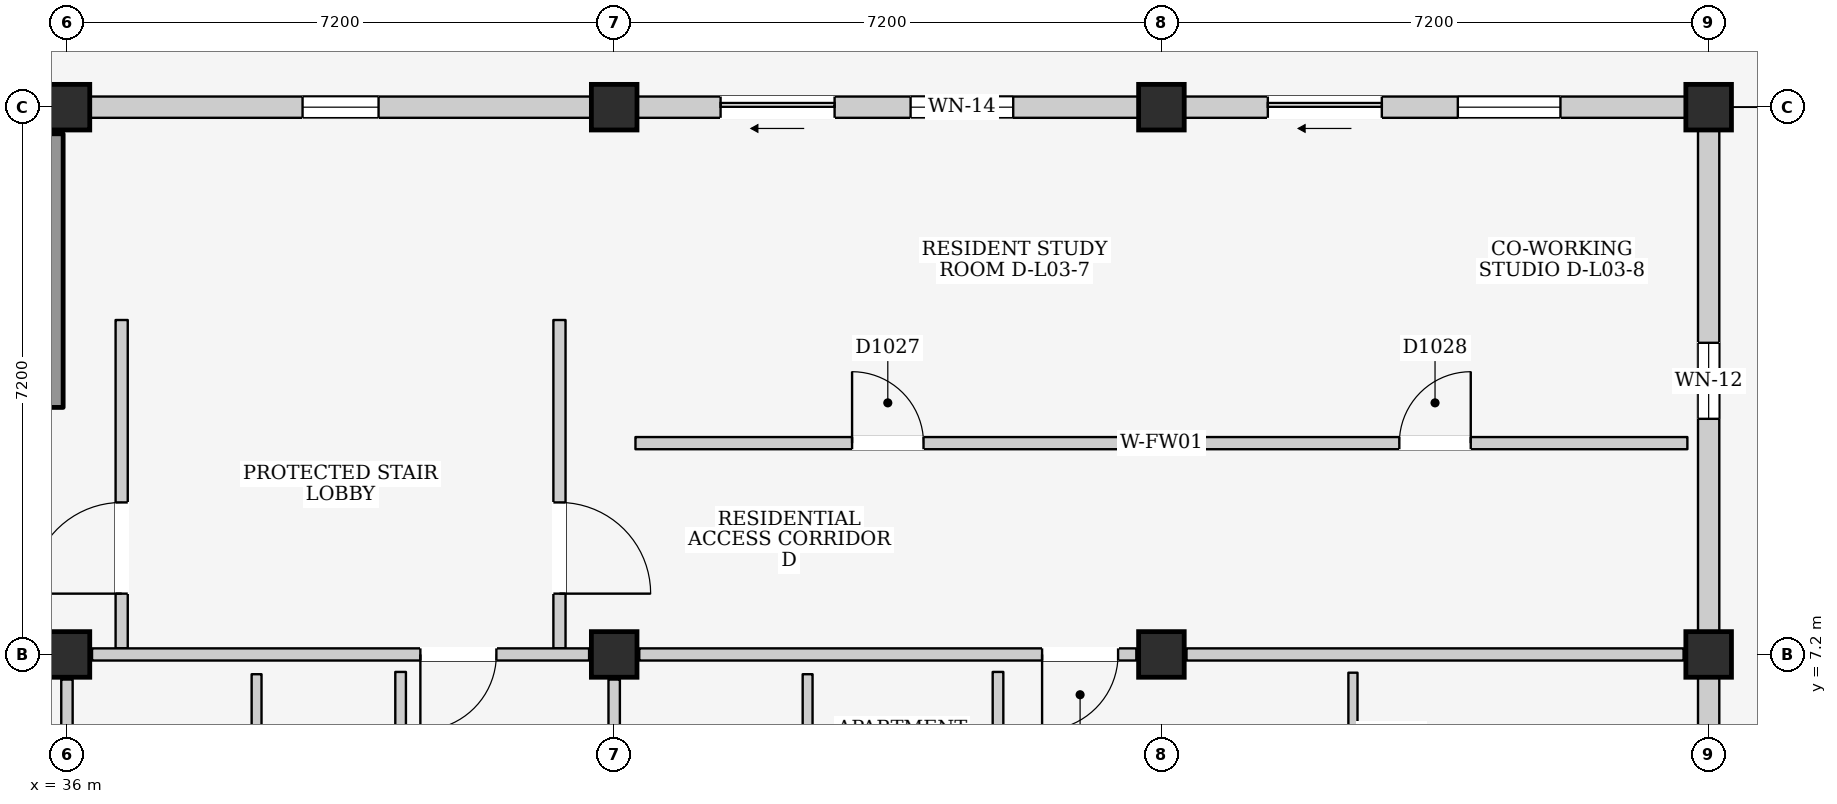
"""IFC4 building model, lengths in metres.
Left out: names, types, materials, properties, quantities, classifications, styles, units other than length and angle.
Written with IfcOpenShell. Run it as: python <this file> out.ifc"""

import sys

from ifc_helpers import new_model, si_unit, direction, frame, frame_2d, origin, origin_2d, place, context, subcontext, project, spatial, rectangle, extrude, element, fill, save


model = new_model("IFC4")
c1 = context("Model", 3, precision=1e-05, world=origin(), true_north=direction((0.0, 1.0)))
c2 = subcontext(c1, "Body", "Model", "MODEL_VIEW")
j1 = project(units=[si_unit("LENGTHUNIT", "METRE"), si_unit("PLANEANGLEUNIT", "RADIAN")], contexts=[c1])
p1 = place(None, origin())
s1 = spatial("IfcSite", under=j1, at=p1, CompositionType="ELEMENT")
p2 = place(p1, origin())
s2 = spatial("IfcBuilding", under=s1, at=p2, CompositionType="ELEMENT")
p3 = place(p2, frame((0.0, 0.0, 12.2)))
s3 = spatial("IfcBuildingStorey", under=s2, at=p3, CompositionType="ELEMENT", Elevation=12.2)
for number, where, z_axis, x_axis in (
    (1, (36.0, 7.2, 0.0), (0.0, 0.0, 1.0), (1.0, 0.0, 0.0)),
    (2, (36.0, 14.4, 0.0), (0.0, 0.0, 1.0), (1.0, 0.0, 0.0)),
    (3, (43.2, 7.2, 0.0), (0.0, 0.0, 1.0), (1.0, 0.0, 0.0)),
    (4, (43.2, 14.4, 0.0), (0.0, 0.0, 1.0), (1.0, 0.0, 0.0)),
    (5, (50.4, 7.2, 0.0), (0.0, 0.0, 1.0), (1.0, 0.0, 0.0)),
    (6, (50.4, 14.4, 0.0), (0.0, 0.0, 1.0), (1.0, 0.0, 0.0)),
    (7, (57.6, 7.2, 0.0), (0.0, 0.0, 1.0), (1.0, 0.0, 0.0)),
    (8, (57.6, 14.4, 0.0), (0.0, 0.0, 1.0), (1.0, 0.0, 0.0)),
):
    element("IfcColumn", number, at=place(p3, frame(where, z_axis=z_axis, x_axis=x_axis)), inside=s3, PredefinedType="COLUMN", context=c2, shape_type="SweptSolid", body=[
        extrude(rectangle(XDim=0.6, YDim=0.6, at=origin_2d()), origin(), (0.0, 0.0, 1.0), 3.2),
    ])
p4 = place(p3, frame((36.3, 14.4, 0.0), z_axis=(0.0, 0.0, 1.0), x_axis=(1.0, 0.0, 0.0)))
e9 = element("IfcWall", 9, at=p4, inside=s3, PredefinedType="ELEMENTEDWALL", context=c2, shape_type="SweptSolid", body=[
    extrude(rectangle(XDim=6.6, YDim=0.28, at=frame_2d((3.3, 0.0))), origin(), (0.0, 0.0, 1.0), 2.365),
])
p5 = place(p4, frame((2.8, 0.0, 1.2)))
e10 = element("IfcOpeningElement", 10, at=p5, cuts=e9, PredefinedType="OPENING", context=c2, shape_type="SweptSolid", body=[
    extrude(rectangle(XDim=1.0, YDim=0.9, at=frame_2d((0.5, 0.45))), frame((0.0, 0.155, 0.0), z_axis=(0.0, -1.0, 0.0), x_axis=(1.0, 0.0, 0.0)), (0.0, 0.0, 1.0), 0.31),
])
p6 = place(p3, frame((43.5, 14.4, 0.0), z_axis=(0.0, 0.0, 1.0), x_axis=(1.0, 0.0, 0.0)))
e11 = element("IfcWall", 11, at=p6, inside=s3, PredefinedType="ELEMENTEDWALL", context=c2, shape_type="SweptSolid", body=[
    extrude(rectangle(XDim=6.6, YDim=0.28, at=frame_2d((3.3, 0.0))), origin(), (0.0, 0.0, 1.0), 2.365),
])
p7 = place(p6, frame((1.1, 0.0, 0.0)))
e12 = element("IfcOpeningElement", 12, at=p7, cuts=e11, PredefinedType="OPENING", context=c2, shape_type="SweptSolid", body=[
    extrude(rectangle(XDim=1.5, YDim=2.12, at=frame_2d((0.75, 1.06))), frame((0.0, 0.155, 0.0), z_axis=(0.0, -1.0, 0.0), x_axis=(1.0, 0.0, 0.0)), (0.0, 0.0, 1.0), 0.31),
])
p8 = place(p6, frame((3.6, 0.0, 0.755)))
e13 = element("IfcOpeningElement", 13, at=p8, cuts=e11, PredefinedType="OPENING", context=c2, shape_type="SweptSolid", body=[
    extrude(rectangle(XDim=1.35, YDim=1.5, at=frame_2d((0.675, 0.75))), frame((0.0, 0.155, 0.0), z_axis=(0.0, -1.0, 0.0), x_axis=(1.0, 0.0, 0.0)), (0.0, 0.0, 1.0), 0.31),
])
p9 = place(p3, frame((57.6, 0.3, 0.0), z_axis=(0.0, 0.0, 1.0), x_axis=(0.0, 1.0, 0.0)))
e14 = element("IfcWall", 14, at=p9, inside=s3, PredefinedType="ELEMENTEDWALL", context=c2, shape_type="SweptSolid", body=[
    extrude(rectangle(XDim=6.6, YDim=0.28, at=frame_2d((3.3, 0.0))), origin(), (0.0, 0.0, 1.0), 2.415),
])
p10 = place(p9, frame((1.4, 0.0, 0.0)))
e15 = element("IfcOpeningElement", 15, at=p10, cuts=e14, PredefinedType="OPENING", context=c2, shape_type="SweptSolid", body=[
    extrude(rectangle(XDim=1.4, YDim=2.1, at=frame_2d((0.7, 1.05))), frame((0.0, 0.155, 0.0), z_axis=(0.0, -1.0, 0.0), x_axis=(1.0, 0.0, 0.0)), (0.0, 0.0, 1.0), 0.31),
])
p11 = place(p9, frame((4.4, 0.0, 0.95)))
e16 = element("IfcOpeningElement", 16, at=p11, cuts=e14, PredefinedType="OPENING", context=c2, shape_type="SweptSolid", body=[
    extrude(rectangle(XDim=1.2, YDim=1.35, at=frame_2d((0.6, 0.675))), frame((0.0, 0.155, 0.0), z_axis=(0.0, -1.0, 0.0), x_axis=(1.0, 0.0, 0.0)), (0.0, 0.0, 1.0), 0.31),
])
p12 = place(p3, frame((50.7, 14.4, 0.0), z_axis=(0.0, 0.0, 1.0), x_axis=(1.0, 0.0, 0.0)))
e17 = element("IfcWall", 17, at=p12, inside=s3, PredefinedType="ELEMENTEDWALL", context=c2, shape_type="SweptSolid", body=[
    extrude(rectangle(XDim=6.6, YDim=0.28, at=frame_2d((3.3, 0.0))), origin(), (0.0, 0.0, 1.0), 2.365),
])
p13 = place(p12, frame((1.1, 0.0, 0.0)))
e18 = element("IfcOpeningElement", 18, at=p13, cuts=e17, PredefinedType="OPENING", context=c2, shape_type="SweptSolid", body=[
    extrude(rectangle(XDim=1.5, YDim=2.12, at=frame_2d((0.75, 1.06))), frame((0.0, 0.155, 0.0), z_axis=(0.0, -1.0, 0.0), x_axis=(1.0, 0.0, 0.0)), (0.0, 0.0, 1.0), 0.31),
])
p14 = place(p12, frame((3.6, 0.0, 0.755)))
e19 = element("IfcOpeningElement", 19, at=p14, cuts=e17, PredefinedType="OPENING", context=c2, shape_type="SweptSolid", body=[
    extrude(rectangle(XDim=1.35, YDim=1.5, at=frame_2d((0.675, 0.75))), frame((0.0, 0.155, 0.0), z_axis=(0.0, -1.0, 0.0), x_axis=(1.0, 0.0, 0.0)), (0.0, 0.0, 1.0), 0.31),
])
p15 = place(p3, frame((57.6, 7.5, 0.0), z_axis=(0.0, 0.0, 1.0), x_axis=(0.0, 1.0, 0.0)))
e20 = element("IfcWall", 20, at=p15, inside=s3, PredefinedType="ELEMENTEDWALL", context=c2, shape_type="SweptSolid", body=[
    extrude(rectangle(XDim=6.6, YDim=0.28, at=frame_2d((3.3, 0.0))), origin(), (0.0, 0.0, 1.0), 2.415),
])
p16 = place(p15, frame((2.8, 0.0, 1.1)))
e21 = element("IfcOpeningElement", 21, at=p16, cuts=e20, PredefinedType="OPENING", context=c2, shape_type="SweptSolid", body=[
    extrude(rectangle(XDim=1.0, YDim=0.9, at=frame_2d((0.5, 0.45))), frame((0.0, 0.155, 0.0), z_axis=(0.0, -1.0, 0.0), x_axis=(1.0, 0.0, 0.0)), (0.0, 0.0, 1.0), 0.31),
])
p17 = place(p3, frame((35.8, 10.45, 0.0), z_axis=(0.0, 0.0, 1.0), x_axis=(0.0, 1.0, 0.0)))
e22 = element("IfcWall", 22, at=p17, inside=s3, PredefinedType="SHEAR", context=c2, shape_type="SweptSolid", body=[
    extrude(rectangle(XDim=3.6, YDim=0.3, at=frame_2d((1.8, 0.0))), origin(), (0.0, 0.0, 1.0), 2.98),
])
p18 = place(p3, frame((36.72, 7.28, 0.0), z_axis=(0.0, 0.0, 1.0), x_axis=(0.0, 1.0, 0.0)))
e23 = element("IfcWall", 23, at=p18, inside=s3, PredefinedType="PARTITIONING", context=c2, shape_type="SweptSolid", body=[
    extrude(rectangle(XDim=4.32, YDim=0.16, at=frame_2d((2.16, 0.0))), origin(), (0.0, 0.0, 1.0), 2.98),
])
p19 = place(p18, frame((0.72, 0.0, 0.0)))
e24 = element("IfcOpeningElement", 24, at=p19, cuts=e23, PredefinedType="OPENING", context=c2, shape_type="SweptSolid", body=[
    extrude(rectangle(XDim=1.2, YDim=2.2, at=frame_2d((0.6, 1.1))), frame((0.0, 0.095, 0.0), z_axis=(0.0, -1.0, 0.0), x_axis=(1.0, 0.0, 0.0)), (0.0, 0.0, 1.0), 0.19),
])
p20 = place(p3, frame((42.48, 7.28, 0.0), z_axis=(0.0, 0.0, 1.0), x_axis=(0.0, 1.0, 0.0)))
e25 = element("IfcWall", 25, at=p20, inside=s3, PredefinedType="PARTITIONING", context=c2, shape_type="SweptSolid", body=[
    extrude(rectangle(XDim=4.32, YDim=0.16, at=frame_2d((2.16, 0.0))), origin(), (0.0, 0.0, 1.0), 2.98),
])
p21 = place(p20, frame((0.72, 0.0, 0.0)))
e26 = element("IfcOpeningElement", 26, at=p21, cuts=e25, PredefinedType="OPENING", context=c2, shape_type="SweptSolid", body=[
    extrude(rectangle(XDim=1.2, YDim=2.2, at=frame_2d((0.6, 1.1))), frame((0.0, 0.095, 0.0), z_axis=(0.0, -1.0, 0.0), x_axis=(1.0, 0.0, 0.0)), (0.0, 0.0, 1.0), 0.19),
])
p22 = place(p3, frame((36.0, 0.33, 0.0), z_axis=(0.0, 0.0, 1.0), x_axis=(0.0, 1.0, 0.0)))
e27 = element("IfcWall", 27, at=p22, inside=s3, PredefinedType="PARTITIONING", context=c2, shape_type="SweptSolid", body=[
    extrude(rectangle(XDim=6.54, YDim=0.15, at=frame_2d((3.27, 0.0))), origin(), (0.0, 0.0, 1.0), 2.415),
])
p23 = place(p3, frame((36.33, 7.2, 0.0), z_axis=(0.0, 0.0, 1.0), x_axis=(1.0, 0.0, 0.0)))
e28 = element("IfcWall", 28, at=p23, inside=s3, PredefinedType="PARTITIONING", context=c2, shape_type="SweptSolid", body=[
    extrude(rectangle(XDim=6.54, YDim=0.16, at=frame_2d((3.27, 0.0))), origin(), (0.0, 0.0, 1.0), 2.365),
])
p24 = place(p23, frame((4.32, 0.0, 0.0)))
e29 = element("IfcOpeningElement", 29, at=p24, cuts=e28, PredefinedType="OPENING", context=c2, shape_type="SweptSolid", body=[
    extrude(rectangle(XDim=1.0, YDim=2.15, at=frame_2d((0.5, 1.075))), frame((0.0, 0.095, 0.0), z_axis=(0.0, -1.0, 0.0), x_axis=(1.0, 0.0, 0.0)), (0.0, 0.0, 1.0), 0.19),
])
p25 = place(p3, frame((43.2, 0.33, 0.0), z_axis=(0.0, 0.0, 1.0), x_axis=(0.0, 1.0, 0.0)))
e30 = element("IfcWall", 30, at=p25, inside=s3, PredefinedType="PARTITIONING", context=c2, shape_type="SweptSolid", body=[
    extrude(rectangle(XDim=6.54, YDim=0.15, at=frame_2d((3.27, 0.0))), origin(), (0.0, 0.0, 1.0), 2.415),
])
p26 = place(p3, frame((38.495, 4.61, 0.0), z_axis=(0.0, 0.0, 1.0), x_axis=(0.0, 1.0, 0.0)))
e31 = element("IfcWall", 31, at=p26, inside=s3, PredefinedType="PARTITIONING", context=c2, shape_type="SweptSolid", body=[
    extrude(rectangle(XDim=2.33, YDim=0.13, at=frame_2d((1.165, 0.0))), origin(), (0.0, 0.0, 1.0), 2.98),
])
p27 = place(p3, frame((40.39, 4.62, 0.0), z_axis=(0.0, 0.0, 1.0), x_axis=(0.0, 1.0, 0.0)))
e32 = element("IfcWall", 32, at=p27, inside=s3, PredefinedType="PARTITIONING", context=c2, shape_type="SweptSolid", body=[
    extrude(rectangle(XDim=2.35, YDim=0.14, at=frame_2d((1.175, 0.0))), origin(), (0.0, 0.0, 1.0), 2.98),
])
p28 = place(p3, frame((43.53, 7.2, 0.0), z_axis=(0.0, 0.0, 1.0), x_axis=(1.0, 0.0, 0.0)))
e33 = element("IfcWall", 33, at=p28, inside=s3, PredefinedType="PARTITIONING", context=c2, shape_type="SweptSolid", body=[
    extrude(rectangle(XDim=6.54, YDim=0.16, at=frame_2d((3.27, 0.0))), origin(), (0.0, 0.0, 1.0), 2.365),
])
p29 = place(p28, frame((5.3, 0.0, 0.0)))
e34 = element("IfcOpeningElement", 34, at=p29, cuts=e33, PredefinedType="OPENING", context=c2, shape_type="SweptSolid", body=[
    extrude(rectangle(XDim=1.0, YDim=2.15, at=frame_2d((0.5, 1.075))), frame((0.0, 0.095, 0.0), z_axis=(0.0, -1.0, 0.0), x_axis=(1.0, 0.0, 0.0)), (0.0, 0.0, 1.0), 0.19),
])
p30 = place(p3, frame((50.73, 7.2, 0.0), z_axis=(0.0, 0.0, 1.0), x_axis=(1.0, 0.0, 0.0)))
e35 = element("IfcWall", 35, at=p30, inside=s3, PredefinedType="PARTITIONING", context=c2, shape_type="SweptSolid", body=[
    extrude(rectangle(XDim=6.54, YDim=0.16, at=frame_2d((3.27, 0.0))), origin(), (0.0, 0.0, 1.0), 2.365),
])
p31 = place(p3, frame((45.745, 3.9, 0.0), z_axis=(0.0, 0.0, 1.0), x_axis=(0.0, 1.0, 0.0)))
e36 = element("IfcWall", 36, at=p31, inside=s3, PredefinedType="PARTITIONING", context=c2, shape_type="SweptSolid", body=[
    extrude(rectangle(XDim=3.04, YDim=0.13, at=frame_2d((1.52, 0.0))), origin(), (0.0, 0.0, 1.0), 2.98),
])
p32 = place(p3, frame((48.25, 3.91, 0.0), z_axis=(0.0, 0.0, 1.0), x_axis=(0.0, 1.0, 0.0)))
e37 = element("IfcWall", 37, at=p32, inside=s3, PredefinedType="PARTITIONING", context=c2, shape_type="SweptSolid", body=[
    extrude(rectangle(XDim=3.06, YDim=0.14, at=frame_2d((1.53, 0.0))), origin(), (0.0, 0.0, 1.0), 2.98),
])
p33 = place(p3, frame((52.92, 3.92, 0.0), z_axis=(0.0, 0.0, 1.0), x_axis=(0.0, 1.0, 0.0)))
e38 = element("IfcWall", 38, at=p33, inside=s3, PredefinedType="PARTITIONING", context=c2, shape_type="SweptSolid", body=[
    extrude(rectangle(XDim=3.04, YDim=0.12, at=frame_2d((1.52, 0.0))), origin(), (0.0, 0.0, 1.0), 2.98),
])
p34 = place(p33, frame((1.04, 0.0, 0.0)))
e39 = element("IfcOpeningElement", 39, at=p34, cuts=e38, PredefinedType="OPENING", context=c2, shape_type="SweptSolid", body=[
    extrude(rectangle(XDim=0.96, YDim=2.15, at=frame_2d((0.48, 1.075))), frame((0.0, 0.075, 0.0), z_axis=(0.0, -1.0, 0.0), x_axis=(1.0, 0.0, 0.0)), (0.0, 0.0, 1.0), 0.15),
])
p35 = place(p3, frame((43.48, 9.98, 0.0), z_axis=(0.0, 0.0, 1.0), x_axis=(1.0, 0.0, 0.0)))
e40 = element("IfcWall", 40, at=p35, inside=s3, PredefinedType="PARTITIONING", context=c2, shape_type="SweptSolid", body=[
    extrude(rectangle(XDim=6.64, YDim=0.16, at=frame_2d((3.32, 0.0))), origin(), (0.0, 0.0, 1.0), 2.98),
])
p36 = place(p35, frame((2.85, 0.0, 0.0)))
e41 = element("IfcOpeningElement", 41, at=p36, cuts=e40, PredefinedType="OPENING", context=c2, shape_type="SweptSolid", body=[
    extrude(rectangle(XDim=0.94, YDim=2.12, at=frame_2d((0.47, 1.06))), frame((0.0, 0.095, 0.0), z_axis=(0.0, -1.0, 0.0), x_axis=(1.0, 0.0, 0.0)), (0.0, 0.0, 1.0), 0.19),
])
p37 = place(p3, frame((50.68, 9.98, 0.0), z_axis=(0.0, 0.0, 1.0), x_axis=(1.0, 0.0, 0.0)))
e42 = element("IfcWall", 42, at=p37, inside=s3, PredefinedType="PARTITIONING", context=c2, shape_type="SweptSolid", body=[
    extrude(rectangle(XDim=6.64, YDim=0.16, at=frame_2d((3.32, 0.0))), origin(), (0.0, 0.0, 1.0), 2.98),
])
p38 = place(p37, frame((2.85, 0.0, 0.0)))
e43 = element("IfcOpeningElement", 43, at=p38, cuts=e42, PredefinedType="OPENING", context=c2, shape_type="SweptSolid", body=[
    extrude(rectangle(XDim=0.94, YDim=2.12, at=frame_2d((0.47, 1.06))), frame((0.0, 0.095, 0.0), z_axis=(0.0, -1.0, 0.0), x_axis=(1.0, 0.0, 0.0)), (0.0, 0.0, 1.0), 0.19),
])
p39 = place(p5, origin())
e44 = element("IfcWindow", 44, at=p39, inside=s3, PartitioningType="SINGLE_PANEL", PredefinedType="WINDOW", context=c2, shape_type="SweptSolid", body=[
    extrude(rectangle(XDim=1.0, YDim=0.9, at=frame_2d((0.5, 0.45))), frame((0.0, 0.03, 0.0), z_axis=(0.0, -1.0, 0.0), x_axis=(1.0, 0.0, 0.0)), (0.0, 0.0, 1.0), 0.06),
])
fill(e10, e44)
p40 = place(p7, frame((1.5, 0.0, 0.0), z_axis=(0.0, 0.0, 1.0), x_axis=(-1.0, 0.0, 0.0)))
e45 = element("IfcDoor", 45, at=p40, inside=s3, OperationType="SLIDING_TO_LEFT", PredefinedType="DOOR", context=c2, shape_type="SweptSolid", body=[
    extrude(rectangle(XDim=1.5, YDim=2.12, at=frame_2d((0.75, 1.06))), frame((0.0, 0.025, 0.0), z_axis=(0.0, -1.0, 0.0), x_axis=(1.0, 0.0, 0.0)), (0.0, 0.0, 1.0), 0.05),
])
fill(e12, e45)
p41 = place(p8, origin())
e46 = element("IfcWindow", 46, at=p41, inside=s3, PartitioningType="SINGLE_PANEL", PredefinedType="WINDOW", context=c2, shape_type="SweptSolid", body=[
    extrude(rectangle(XDim=1.35, YDim=1.5, at=frame_2d((0.675, 0.75))), frame((0.0, 0.03, 0.0), z_axis=(0.0, -1.0, 0.0), x_axis=(1.0, 0.0, 0.0)), (0.0, 0.0, 1.0), 0.06),
])
fill(e13, e46)
p42 = place(p13, frame((1.5, 0.0, 0.0), z_axis=(0.0, 0.0, 1.0), x_axis=(-1.0, 0.0, 0.0)))
e47 = element("IfcDoor", 47, at=p42, inside=s3, OperationType="SLIDING_TO_LEFT", PredefinedType="DOOR", context=c2, shape_type="SweptSolid", body=[
    extrude(rectangle(XDim=1.5, YDim=2.12, at=frame_2d((0.75, 1.06))), frame((0.0, 0.025, 0.0), z_axis=(0.0, -1.0, 0.0), x_axis=(1.0, 0.0, 0.0)), (0.0, 0.0, 1.0), 0.05),
])
fill(e18, e47)
p43 = place(p14, origin())
e48 = element("IfcWindow", 48, at=p43, inside=s3, PartitioningType="SINGLE_PANEL", PredefinedType="WINDOW", context=c2, shape_type="SweptSolid", body=[
    extrude(rectangle(XDim=1.35, YDim=1.5, at=frame_2d((0.675, 0.75))), frame((0.0, 0.03, 0.0), z_axis=(0.0, -1.0, 0.0), x_axis=(1.0, 0.0, 0.0)), (0.0, 0.0, 1.0), 0.06),
])
fill(e19, e48)
p44 = place(p16, origin())
e49 = element("IfcWindow", 49, at=p44, inside=s3, PartitioningType="SINGLE_PANEL", PredefinedType="WINDOW", context=c2, shape_type="SweptSolid", body=[
    extrude(rectangle(XDim=1.0, YDim=0.9, at=frame_2d((0.5, 0.45))), frame((0.0, 0.03, 0.0), z_axis=(0.0, -1.0, 0.0), x_axis=(1.0, 0.0, 0.0)), (0.0, 0.0, 1.0), 0.06),
])
fill(e21, e49)
p45 = place(p19, origin())
e50 = element("IfcDoor", 50, at=p45, inside=s3, OperationType="SINGLE_SWING_LEFT", PredefinedType="DOOR", context=c2, shape_type="SweptSolid", body=[
    extrude(rectangle(XDim=1.2, YDim=2.2, at=frame_2d((0.6, 1.1))), frame((0.0, 0.025, 0.0), z_axis=(0.0, -1.0, 0.0), x_axis=(1.0, 0.0, 0.0)), (0.0, 0.0, 1.0), 0.05),
])
fill(e24, e50)
p46 = place(p21, frame((1.2, 0.0, 0.0), z_axis=(0.0, 0.0, 1.0), x_axis=(-1.0, 0.0, 0.0)))
e51 = element("IfcDoor", 51, at=p46, inside=s3, OperationType="SINGLE_SWING_RIGHT", PredefinedType="DOOR", context=c2, shape_type="SweptSolid", body=[
    extrude(rectangle(XDim=1.2, YDim=2.2, at=frame_2d((0.6, 1.1))), frame((0.0, 0.025, 0.0), z_axis=(0.0, -1.0, 0.0), x_axis=(1.0, 0.0, 0.0)), (0.0, 0.0, 1.0), 0.05),
])
fill(e26, e51)
p47 = place(p24, frame((1.0, 0.0, 0.0), z_axis=(0.0, 0.0, 1.0), x_axis=(-1.0, 0.0, 0.0)))
e52 = element("IfcDoor", 52, at=p47, inside=s3, OperationType="SINGLE_SWING_RIGHT", PredefinedType="DOOR", context=c2, shape_type="SweptSolid", body=[
    extrude(rectangle(XDim=1.0, YDim=2.15, at=frame_2d((0.5, 1.075))), frame((0.0, 0.025, 0.0), z_axis=(0.0, -1.0, 0.0), x_axis=(1.0, 0.0, 0.0)), (0.0, 0.0, 1.0), 0.05),
])
fill(e29, e52)
p48 = place(p29, frame((1.0, 0.0, 0.0), z_axis=(0.0, 0.0, 1.0), x_axis=(-1.0, 0.0, 0.0)))
e53 = element("IfcDoor", 53, at=p48, inside=s3, OperationType="SINGLE_SWING_RIGHT", PredefinedType="DOOR", context=c2, shape_type="SweptSolid", body=[
    extrude(rectangle(XDim=1.0, YDim=2.15, at=frame_2d((0.5, 1.075))), frame((0.0, 0.025, 0.0), z_axis=(0.0, -1.0, 0.0), x_axis=(1.0, 0.0, 0.0)), (0.0, 0.0, 1.0), 0.05),
])
fill(e34, e53)
p49 = place(p36, origin())
e54 = element("IfcDoor", 54, at=p49, inside=s3, OperationType="SINGLE_SWING_LEFT", PredefinedType="DOOR", context=c2, shape_type="SweptSolid", body=[
    extrude(rectangle(XDim=0.94, YDim=2.12, at=frame_2d((0.47, 1.06))), frame((0.0, 0.025, 0.0), z_axis=(0.0, -1.0, 0.0), x_axis=(1.0, 0.0, 0.0)), (0.0, 0.0, 1.0), 0.05),
])
fill(e41, e54)
p50 = place(p38, origin())
e55 = element("IfcDoor", 55, at=p50, inside=s3, OperationType="SINGLE_SWING_RIGHT", PredefinedType="DOOR", context=c2, shape_type="SweptSolid", body=[
    extrude(rectangle(XDim=0.94, YDim=2.12, at=frame_2d((0.47, 1.06))), frame((0.0, 0.025, 0.0), z_axis=(0.0, -1.0, 0.0), x_axis=(1.0, 0.0, 0.0)), (0.0, 0.0, 1.0), 0.05),
])
fill(e43, e55)
save(model, sys.argv[1])
